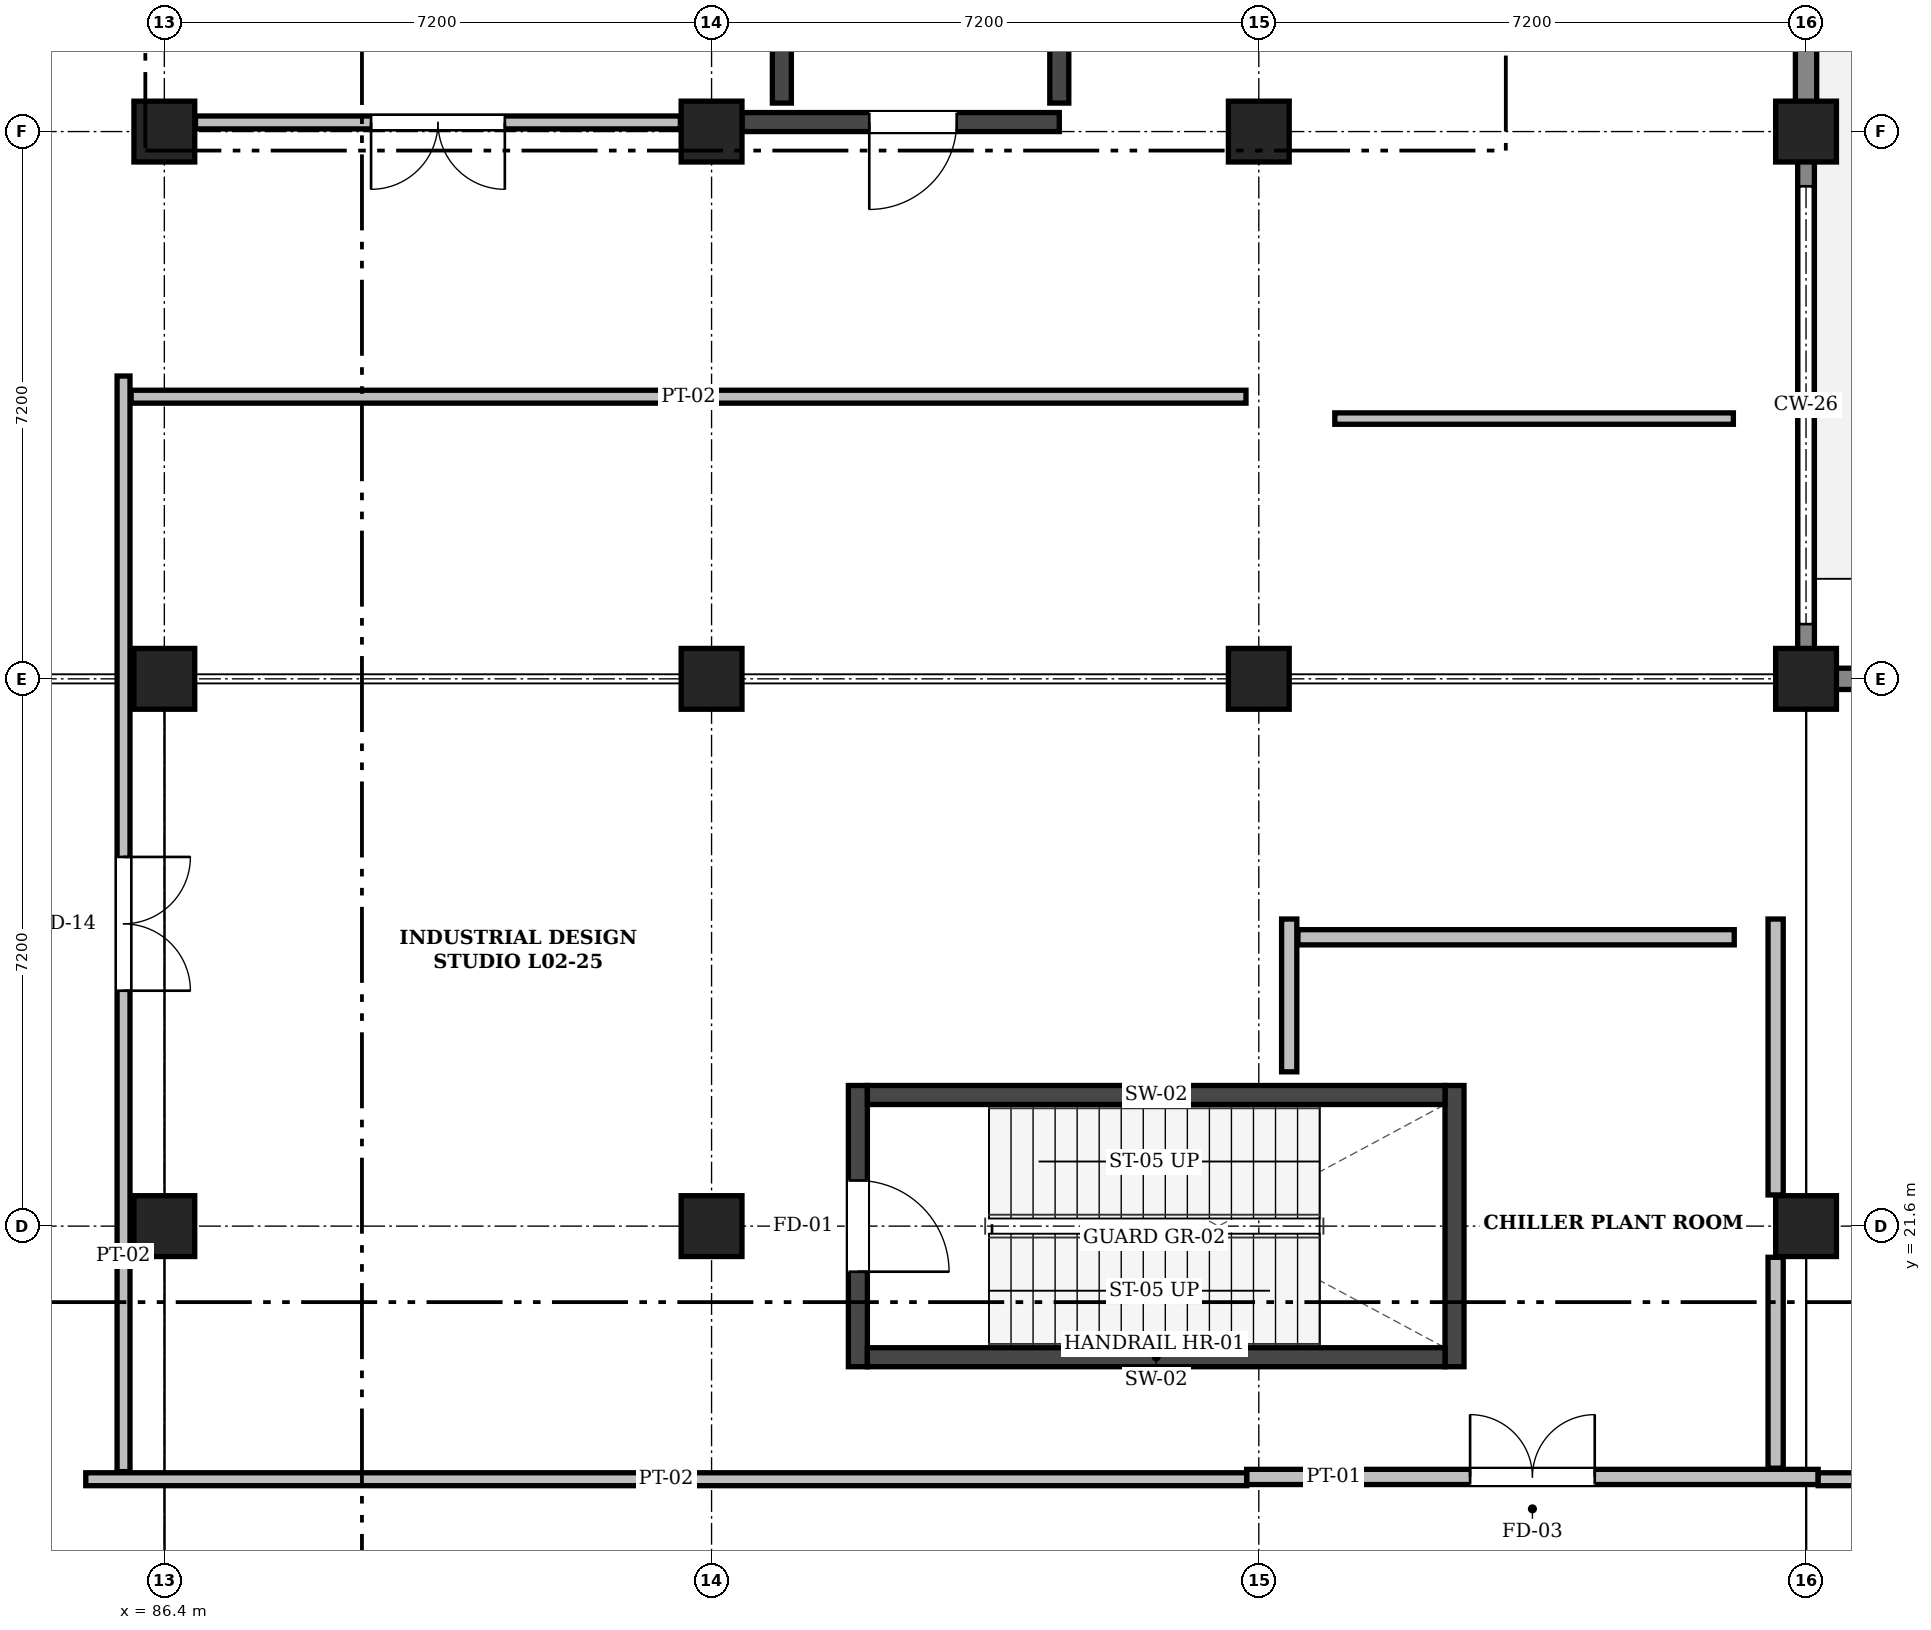
"""IFC4 building model, lengths in metres.
Left out: names, types, materials, properties, quantities, classifications, styles, units other than length and angle.
Written with IfcOpenShell. Run it as: python <this file> out.ifc"""

import sys

from ifc_helpers import new_model, si_unit, direction, frame, frame_2d, origin, origin_2d, place, context, subcontext, project, spatial, rectangle, extrude, element, fill, save


model = new_model("IFC4")
c1 = context("Model", 3, precision=1e-05, world=origin(), true_north=direction((0.0, 1.0)))
c2 = subcontext(c1, "Body", "Model", "MODEL_VIEW")
j1 = project(units=[si_unit("LENGTHUNIT", "METRE"), si_unit("PLANEANGLEUNIT", "RADIAN")], contexts=[c1])
p1 = place(None, origin())
s1 = spatial("IfcSite", under=j1, at=p1, CompositionType="ELEMENT")
p2 = place(p1, origin())
s2 = spatial("IfcBuilding", under=s1, at=p2, CompositionType="ELEMENT")
p3 = place(p2, frame((0.0, 0.0, 9.6)))
s3 = spatial("IfcBuildingStorey", under=s2, at=p3, CompositionType="ELEMENT", Elevation=9.6)
for number, where, z_axis, x_axis in (
    (1, (86.4, 21.6, 0.0), (0.0, 0.0, 1.0), (1.0, 0.0, 0.0)),
    (2, (86.4, 28.8, 0.0), (0.0, 0.0, 1.0), (1.0, 0.0, 0.0)),
    (3, (86.4, 36.0, 0.0), (0.0, 0.0, 1.0), (1.0, 0.0, 0.0)),
    (4, (93.6, 21.6, 0.0), (0.0, 0.0, 1.0), (1.0, 0.0, 0.0)),
    (5, (93.6, 28.8, 0.0), (0.0, 0.0, 1.0), (1.0, 0.0, 0.0)),
    (6, (93.6, 36.0, 0.0), (0.0, 0.0, 1.0), (1.0, 0.0, 0.0)),
    (7, (100.8, 28.8, 0.0), (0.0, 0.0, 1.0), (1.0, 0.0, 0.0)),
    (8, (100.8, 36.0, 0.0), (0.0, 0.0, 1.0), (1.0, 0.0, 0.0)),
    (9, (108.0, 21.6, 0.0), (0.0, 0.0, 1.0), (1.0, 0.0, 0.0)),
    (10, (108.0, 28.8, 0.0), (0.0, 0.0, 1.0), (1.0, 0.0, 0.0)),
    (11, (108.0, 36.0, 0.0), (0.0, 0.0, 1.0), (1.0, 0.0, 0.0)),
):
    element("IfcColumn", number, at=place(p3, frame(where, z_axis=z_axis, x_axis=x_axis)), inside=s3, PredefinedType="COLUMN", context=c2, shape_type="SweptSolid", body=[
        extrude(rectangle(XDim=0.8, YDim=0.8, at=origin_2d()), origin(), (0.0, 0.0, 1.0), 4.8),
    ])
p4 = place(p3, frame((108.0, 43.2, 0.0), z_axis=(0.0, 0.0, 1.0), x_axis=(0.0, -1.0, 0.0)))
e12 = element("IfcWall", 12, at=p4, inside=s3, PredefinedType="SOLIDWALL", context=c2, shape_type="SweptSolid", body=[
    extrude(rectangle(XDim=7.2, YDim=0.28, at=frame_2d((3.6, 0.0))), origin(), (0.0, 0.0, 1.0), 4.52),
])
p5 = place(p4, frame((1.675, 0.0, 0.95)))
e13 = element("IfcOpeningElement", 13, at=p5, cuts=e12, PredefinedType="OPENING", context=c2, shape_type="SweptSolid", body=[
    extrude(rectangle(XDim=3.85, YDim=1.8, at=frame_2d((1.925, 0.9))), frame((0.0, 0.152, 0.0), z_axis=(0.0, -1.0, 0.0), x_axis=(1.0, 0.0, 0.0)), (0.0, 0.0, 1.0), 0.304),
])
p6 = place(p3, frame((108.0, 36.0, 0.0), z_axis=(0.0, 0.0, 1.0), x_axis=(0.0, -1.0, 0.0)))
e14 = element("IfcWall", 14, at=p6, inside=s3, PredefinedType="SOLIDWALL", context=c2, shape_type="SweptSolid", body=[
    extrude(rectangle(XDim=7.048, YDim=0.22, at=frame_2d((3.524, 0.0))), origin(), (0.0, 0.0, 1.0), 1.24),
])
p7 = place(p3, frame((107.85, 28.8, 0.0), z_axis=(0.0, 0.0, 1.0), x_axis=(1.0, 0.0, 0.0)))
e15 = element("IfcWall", 15, at=p7, inside=s3, PredefinedType="SOLIDWALL", context=c2, shape_type="SweptSolid", body=[
    extrude(rectangle(XDim=7.35, YDim=0.28, at=frame_2d((3.675, 0.0))), origin(), (0.0, 0.0, 1.0), 4.52),
])
p8 = place(p7, frame((3.2, 0.0, 0.95)))
e16 = element("IfcOpeningElement", 16, at=p8, cuts=e15, PredefinedType="OPENING", context=c2, shape_type="SweptSolid", body=[
    extrude(rectangle(XDim=0.95, YDim=2.05, at=frame_2d((0.475, 1.025))), frame((0.0, 0.152, 0.0), z_axis=(0.0, -1.0, 0.0), x_axis=(1.0, 0.0, 0.0)), (0.0, 0.0, 1.0), 0.304),
])
p9 = place(p3, frame((95.525, 19.75, 0.0), z_axis=(0.0, 0.0, 1.0), x_axis=(0.0, 1.0, 0.0)))
e17 = element("IfcWall", 17, at=p9, inside=s3, PredefinedType="SHEAR", context=c2, shape_type="SweptSolid", body=[
    extrude(rectangle(XDim=3.7, YDim=0.25, at=frame_2d((1.85, 0.0))), origin(), (0.0, 0.0, 1.0), 4.55),
])
p10 = place(p9, frame((1.25, 0.0, 0.0)))
e18 = element("IfcOpeningElement", 18, at=p10, cuts=e17, PredefinedType="OPENING", context=c2, shape_type="SweptSolid", body=[
    extrude(rectangle(XDim=1.2, YDim=2.15, at=frame_2d((0.6, 1.075))), frame((0.0, 0.137, 0.0), z_axis=(0.0, -1.0, 0.0), x_axis=(1.0, 0.0, 0.0)), (0.0, 0.0, 1.0), 0.274),
])
p11 = place(p3, frame((103.375, 19.75, 0.0), z_axis=(0.0, 0.0, 1.0), x_axis=(0.0, 1.0, 0.0)))
e19 = element("IfcWall", 19, at=p11, inside=s3, PredefinedType="SHEAR", context=c2, shape_type="SweptSolid", body=[
    extrude(rectangle(XDim=3.7, YDim=0.25, at=frame_2d((1.85, 0.0))), origin(), (0.0, 0.0, 1.0), 4.55),
])
for number, where, z_axis, x_axis in (
    (20, (95.65, 19.875, 0.0), (0.0, 0.0, 1.0), (1.0, 0.0, 0.0)),
    (21, (95.65, 23.325, 0.0), (0.0, 0.0, 1.0), (1.0, 0.0, 0.0)),
):
    element("IfcWall", number, at=place(p3, frame(where, z_axis=z_axis, x_axis=x_axis)), inside=s3, PredefinedType="SHEAR", context=c2, shape_type="SweptSolid", body=[
        extrude(rectangle(XDim=7.6, YDim=0.25, at=frame_2d((3.8, 0.0))), origin(), (0.0, 0.0, 1.0), 4.55),
    ])
p12 = place(p3, frame((94.0, 36.125, 0.0), z_axis=(0.0, 0.0, 1.0), x_axis=(1.0, 0.0, 0.0)))
e22 = element("IfcWall", 22, at=p12, inside=s3, PredefinedType="SHEAR", context=c2, shape_type="SweptSolid", body=[
    extrude(rectangle(XDim=4.175, YDim=0.25, at=frame_2d((2.087, 0.0))), origin(), (0.0, 0.0, 1.0), 4.55),
])
p13 = place(p12, frame((1.675, 0.0, 0.0)))
e23 = element("IfcOpeningElement", 23, at=p13, cuts=e22, PredefinedType="OPENING", context=c2, shape_type="SweptSolid", body=[
    extrude(rectangle(XDim=1.15, YDim=2.15, at=frame_2d((0.575, 1.075))), frame((0.0, 0.137, 0.0), z_axis=(0.0, -1.0, 0.0), x_axis=(1.0, 0.0, 0.0)), (0.0, 0.0, 1.0), 0.274),
])
p14 = place(p3, frame((94.525, 36.375, 0.0), z_axis=(0.0, 0.0, 1.0), x_axis=(0.0, 1.0, 0.0)))
e24 = element("IfcWall", 24, at=p14, inside=s3, PredefinedType="SHEAR", context=c2, shape_type="SweptSolid", body=[
    extrude(rectangle(XDim=2.77, YDim=0.25, at=frame_2d((1.385, 0.0))), origin(), (0.0, 0.0, 1.0), 4.55),
])
p15 = place(p3, frame((98.175, 36.375, 0.0), z_axis=(0.0, 0.0, 1.0), x_axis=(0.0, 1.0, 0.0)))
e25 = element("IfcWall", 25, at=p15, inside=s3, PredefinedType="SHEAR", context=c2, shape_type="SweptSolid", body=[
    extrude(rectangle(XDim=3.225, YDim=0.25, at=frame_2d((1.613, 0.0))), origin(), (0.0, 0.0, 1.0), 4.55),
])
p16 = place(p3, frame((100.64, 18.3, 0.0), z_axis=(0.0, 0.0, 1.0), x_axis=(1.0, 0.0, 0.0)))
e26 = element("IfcWall", 26, at=p16, inside=s3, PredefinedType="PARTITIONING", context=c2, shape_type="SweptSolid", body=[
    extrude(rectangle(XDim=7.52, YDim=0.2, at=frame_2d((3.76, 0.0))), origin(), (0.0, 0.0, 1.0), 4.46),
])
p17 = place(p16, frame((2.94, 0.0, 0.0)))
e27 = element("IfcOpeningElement", 27, at=p17, cuts=e26, PredefinedType="OPENING", context=c2, shape_type="SweptSolid", body=[
    extrude(rectangle(XDim=1.64, YDim=2.24, at=frame_2d((0.82, 1.12))), frame((0.0, 0.112, 0.0), z_axis=(0.0, -1.0, 0.0), x_axis=(1.0, 0.0, 0.0)), (0.0, 0.0, 1.0), 0.224),
])
p18 = place(p3, frame((101.2, 23.63, 0.0), z_axis=(0.0, 0.0, 1.0), x_axis=(0.0, 1.0, 0.0)))
e28 = element("IfcWall", 28, at=p18, inside=s3, PredefinedType="PARTITIONING", context=c2, shape_type="SweptSolid", body=[
    extrude(rectangle(XDim=2.01, YDim=0.2, at=frame_2d((1.005, 0.0))), origin(), (0.0, 0.0, 1.0), 4.46),
])
p19 = place(p3, frame((101.315, 25.4, 0.0), z_axis=(0.0, 0.0, 1.0), x_axis=(1.0, 0.0, 0.0)))
e29 = element("IfcWall", 29, at=p19, inside=s3, PredefinedType="PARTITIONING", context=c2, shape_type="SweptSolid", body=[
    extrude(rectangle(XDim=5.74, YDim=0.2, at=frame_2d((2.87, 0.0))), origin(), (0.0, 0.0, 1.0), 4.46),
])
p20 = place(p3, frame((107.6, 22.01, 0.0), z_axis=(0.0, 0.0, 1.0), x_axis=(0.0, 1.0, 0.0)))
e30 = element("IfcWall", 30, at=p20, inside=s3, PredefinedType="PARTITIONING", context=c2, shape_type="SweptSolid", body=[
    extrude(rectangle(XDim=3.63, YDim=0.2, at=frame_2d((1.815, 0.0))), origin(), (0.0, 0.0, 1.0), 4.46),
])
p21 = place(p3, frame((107.6, 18.415, 0.0), z_axis=(0.0, 0.0, 1.0), x_axis=(0.0, 1.0, 0.0)))
e31 = element("IfcWall", 31, at=p21, inside=s3, PredefinedType="PARTITIONING", context=c2, shape_type="SweptSolid", body=[
    extrude(rectangle(XDim=2.775, YDim=0.2, at=frame_2d((1.387, 0.0))), origin(), (0.0, 0.0, 1.0), 4.46),
])
p22 = place(p3, frame((85.366, 18.27, 0.0), z_axis=(0.0, 0.0, 1.0), x_axis=(1.0, 0.0, 0.0)))
e32 = element("IfcWall", 32, at=p22, inside=s3, PredefinedType="PARTITIONING", context=c2, shape_type="SweptSolid", body=[
    extrude(rectangle(XDim=15.273, YDim=0.17, at=frame_2d((7.637, 0.0))), origin(), (0.0, 0.0, 1.0), 4.46),
])
p23 = place(p3, frame((108.16, 18.27, 0.0), z_axis=(0.0, 0.0, 1.0), x_axis=(1.0, 0.0, 0.0)))
e33 = element("IfcWall", 33, at=p23, inside=s3, PredefinedType="PARTITIONING", context=c2, shape_type="SweptSolid", body=[
    extrude(rectangle(XDim=20.86, YDim=0.17, at=frame_2d((10.43, 0.0))), origin(), (0.0, 0.0, 1.0), 4.46),
])
p24 = place(p23, frame((9.76, 0.0, 0.0)))
e34 = element("IfcOpeningElement", 34, at=p24, cuts=e33, PredefinedType="OPENING", context=c2, shape_type="SweptSolid", body=[
    extrude(rectangle(XDim=1.34, YDim=2.24, at=frame_2d((0.67, 1.12))), frame((0.0, 0.097, 0.0), z_axis=(0.0, -1.0, 0.0), x_axis=(1.0, 0.0, 0.0)), (0.0, 0.0, 1.0), 0.194),
])
p25 = place(p23, frame((7.59, 0.0, 0.0)))
e35 = element("IfcOpeningElement", 35, at=p25, cuts=e33, PredefinedType="OPENING", context=c2, shape_type="SweptSolid", body=[
    extrude(rectangle(XDim=1.68, YDim=2.28, at=frame_2d((0.84, 1.14))), frame((0.0, 0.097, 0.0), z_axis=(0.0, -1.0, 0.0), x_axis=(1.0, 0.0, 0.0)), (0.0, 0.0, 1.0), 0.194),
])
p26 = place(p23, frame((11.55, 0.0, 0.0)))
e36 = element("IfcOpeningElement", 36, at=p26, cuts=e33, PredefinedType="OPENING", context=c2, shape_type="SweptSolid", body=[
    extrude(rectangle(XDim=1.76, YDim=2.3, at=frame_2d((0.88, 1.15))), frame((0.0, 0.097, 0.0), z_axis=(0.0, -1.0, 0.0), x_axis=(1.0, 0.0, 0.0)), (0.0, 0.0, 1.0), 0.194),
])
p27 = place(p23, frame((5.31, 0.0, 0.0)))
e37 = element("IfcOpeningElement", 37, at=p27, cuts=e33, PredefinedType="OPENING", context=c2, shape_type="SweptSolid", body=[
    extrude(rectangle(XDim=1.84, YDim=2.3, at=frame_2d((0.92, 1.15))), frame((0.0, 0.097, 0.0), z_axis=(0.0, -1.0, 0.0), x_axis=(1.0, 0.0, 0.0)), (0.0, 0.0, 1.0), 0.194),
])
p28 = place(p23, frame((13.67, 0.0, 0.0)))
e38 = element("IfcOpeningElement", 38, at=p28, cuts=e33, PredefinedType="OPENING", context=c2, shape_type="SweptSolid", body=[
    extrude(rectangle(XDim=1.92, YDim=2.32, at=frame_2d((0.96, 1.16))), frame((0.0, 0.097, 0.0), z_axis=(0.0, -1.0, 0.0), x_axis=(1.0, 0.0, 0.0)), (0.0, 0.0, 1.0), 0.194),
])
p29 = place(p23, frame((2.81, 0.0, 0.0)))
e39 = element("IfcOpeningElement", 39, at=p29, cuts=e33, PredefinedType="OPENING", context=c2, shape_type="SweptSolid", body=[
    extrude(rectangle(XDim=2.04, YDim=2.34, at=frame_2d((1.02, 1.17))), frame((0.0, 0.097, 0.0), z_axis=(0.0, -1.0, 0.0), x_axis=(1.0, 0.0, 0.0)), (0.0, 0.0, 1.0), 0.194),
])
p30 = place(p23, frame((15.95, 0.0, 0.0)))
e40 = element("IfcOpeningElement", 40, at=p30, cuts=e33, PredefinedType="OPENING", context=c2, shape_type="SweptSolid", body=[
    extrude(rectangle(XDim=2.16, YDim=2.35, at=frame_2d((1.08, 1.175))), frame((0.0, 0.097, 0.0), z_axis=(0.0, -1.0, 0.0), x_axis=(1.0, 0.0, 0.0)), (0.0, 0.0, 1.0), 0.194),
])
p31 = place(p3, frame((85.863, 18.37, 0.0), z_axis=(0.0, 0.0, 1.0), x_axis=(0.0, 1.0, 0.0)))
e41 = element("IfcWall", 41, at=p31, inside=s3, PredefinedType="PARTITIONING", context=c2, shape_type="SweptSolid", body=[
    extrude(rectangle(XDim=14.414, YDim=0.17, at=frame_2d((7.207, 0.0))), origin(), (0.0, 0.0, 1.0), 4.46),
])
p32 = place(p31, frame((6.327, 0.0, 0.0)))
e42 = element("IfcOpeningElement", 42, at=p32, cuts=e41, PredefinedType="OPENING", context=c2, shape_type="SweptSolid", body=[
    extrude(rectangle(XDim=1.76, YDim=2.3, at=frame_2d((0.88, 1.15))), frame((0.0, 0.097, 0.0), z_axis=(0.0, -1.0, 0.0), x_axis=(1.0, 0.0, 0.0)), (0.0, 0.0, 1.0), 0.194),
])
p33 = place(p3, frame((85.963, 32.512, 0.0), z_axis=(0.0, 0.0, 1.0), x_axis=(1.0, 0.0, 0.0)))
e43 = element("IfcWall", 43, at=p33, inside=s3, PredefinedType="PARTITIONING", context=c2, shape_type="SweptSolid", body=[
    extrude(rectangle(XDim=14.668, YDim=0.17, at=frame_2d((7.334, 0.0))), origin(), (0.0, 0.0, 1.0), 4.46),
])
p34 = place(p3, frame((86.81, 36.12, 0.0), z_axis=(0.0, 0.0, 1.0), x_axis=(1.0, 0.0, 0.0)))
e44 = element("IfcWall", 44, at=p34, inside=s3, PredefinedType="PARTITIONING", context=c2, shape_type="SweptSolid", body=[
    extrude(rectangle(XDim=6.38, YDim=0.17, at=frame_2d((3.19, 0.0))), origin(), (0.0, 0.0, 1.0), 3.93),
])
p35 = place(p34, frame((2.31, 0.0, 0.0)))
e45 = element("IfcOpeningElement", 45, at=p35, cuts=e44, PredefinedType="OPENING", context=c2, shape_type="SweptSolid", body=[
    extrude(rectangle(XDim=1.76, YDim=2.3, at=frame_2d((0.88, 1.15))), frame((0.0, 0.097, 0.0), z_axis=(0.0, -1.0, 0.0), x_axis=(1.0, 0.0, 0.0)), (0.0, 0.0, 1.0), 0.194),
])
p36 = place(p3, frame((101.8, 32.224, 0.0), z_axis=(0.0, 0.0, 1.0), x_axis=(1.0, 0.0, 0.0)))
e46 = element("IfcWall", 46, at=p36, inside=s3, PredefinedType="PARTITIONING", context=c2, shape_type="SweptSolid", body=[
    extrude(rectangle(XDim=5.244, YDim=0.15, at=frame_2d((2.622, 0.0))), origin(), (0.0, 0.0, 1.0), 4.46),
])
p37 = place(p10, frame((1.2, 0.0, 0.0), z_axis=(0.0, 0.0, 1.0), x_axis=(-1.0, 0.0, 0.0)))
e47 = element("IfcDoor", 47, at=p37, inside=s3, OperationType="SINGLE_SWING_RIGHT", PredefinedType="DOOR", context=c2, shape_type="SweptSolid", body=[
    extrude(rectangle(XDim=1.2, YDim=2.15, at=frame_2d((0.6, 1.075))), frame((0.0, 0.025, 0.0), z_axis=(0.0, -1.0, 0.0), x_axis=(1.0, 0.0, 0.0)), (0.0, 0.0, 1.0), 0.05),
])
fill(e18, e47)
p38 = place(p13, frame((1.15, 0.0, 0.0), z_axis=(0.0, 0.0, 1.0), x_axis=(-1.0, 0.0, 0.0)))
e48 = element("IfcDoor", 48, at=p38, inside=s3, OperationType="SINGLE_SWING_RIGHT", PredefinedType="DOOR", context=c2, shape_type="SweptSolid", body=[
    extrude(rectangle(XDim=1.15, YDim=2.15, at=frame_2d((0.575, 1.075))), frame((0.0, 0.025, 0.0), z_axis=(0.0, -1.0, 0.0), x_axis=(1.0, 0.0, 0.0)), (0.0, 0.0, 1.0), 0.05),
])
fill(e23, e48)
p39 = place(p32, frame((1.76, 0.0, 0.0), z_axis=(0.0, 0.0, 1.0), x_axis=(-1.0, 0.0, 0.0)))
e49 = element("IfcDoor", 49, at=p39, inside=s3, OperationType="DOUBLE_DOOR_SINGLE_SWING", PredefinedType="DOOR", context=c2, shape_type="SweptSolid", body=[
    extrude(rectangle(XDim=1.76, YDim=2.3, at=frame_2d((0.88, 1.15))), frame((0.0, 0.025, 0.0), z_axis=(0.0, -1.0, 0.0), x_axis=(1.0, 0.0, 0.0)), (0.0, 0.0, 1.0), 0.05),
])
fill(e42, e49)
p40 = place(p17, origin())
e50 = element("IfcDoor", 50, at=p40, inside=s3, OperationType="DOUBLE_DOOR_SINGLE_SWING", PredefinedType="DOOR", context=c2, shape_type="SweptSolid", body=[
    extrude(rectangle(XDim=1.64, YDim=2.24, at=frame_2d((0.82, 1.12))), frame((0.0, 0.025, 0.0), z_axis=(0.0, -1.0, 0.0), x_axis=(1.0, 0.0, 0.0)), (0.0, 0.0, 1.0), 0.05),
])
fill(e27, e50)
p41 = place(p35, frame((1.76, 0.0, 0.0), z_axis=(0.0, 0.0, 1.0), x_axis=(-1.0, 0.0, 0.0)))
e51 = element("IfcDoor", 51, at=p41, inside=s3, OperationType="DOUBLE_DOOR_SINGLE_SWING", PredefinedType="DOOR", context=c2, shape_type="SweptSolid", body=[
    extrude(rectangle(XDim=1.76, YDim=2.3, at=frame_2d((0.88, 1.15))), frame((0.0, 0.025, 0.0), z_axis=(0.0, -1.0, 0.0), x_axis=(1.0, 0.0, 0.0)), (0.0, 0.0, 1.0), 0.05),
])
fill(e45, e51)
save(model, sys.argv[1])
